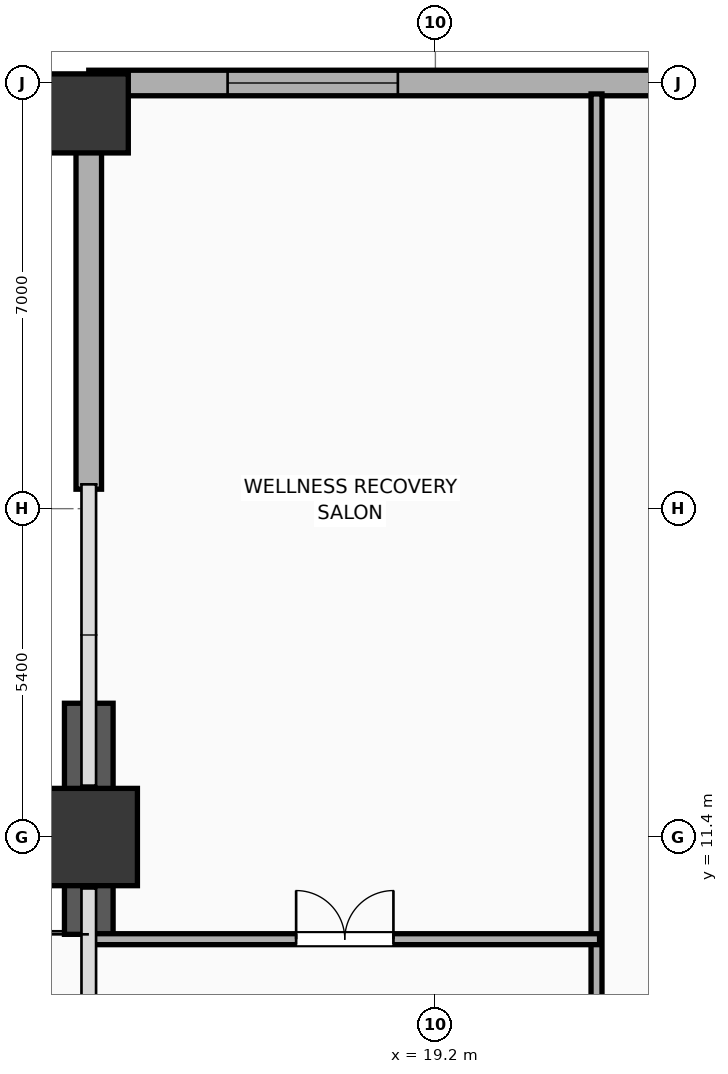
"""IFC4 building model, lengths in metres.
Left out: names, types, materials, properties, quantities, classifications, styles, units other than length and angle.
Written with IfcOpenShell. Run it as: python <this file> out.ifc"""

import sys

from ifc_helpers import new_model, si_unit, direction, frame, frame_2d, origin, origin_2d, place, context, subcontext, project, spatial, rectangle, extrude, element, fill, save


model = new_model("IFC4")
c1 = context("Model", 3, precision=1e-05, world=origin(), true_north=direction((0.0, 1.0)))
c2 = subcontext(c1, "Body", "Model", "MODEL_VIEW")
j1 = project(units=[si_unit("LENGTHUNIT", "METRE"), si_unit("PLANEANGLEUNIT", "RADIAN")], contexts=[c1])
p1 = place(None, origin())
s1 = spatial("IfcSite", under=j1, at=p1, CompositionType="ELEMENT")
p2 = place(p1, origin())
s2 = spatial("IfcBuilding", under=s1, at=p2, CompositionType="ELEMENT")
p3 = place(p2, frame((0.0, 0.0, 10.4)))
s3 = spatial("IfcBuildingStorey", under=s2, at=p3, CompositionType="ELEMENT", Elevation=10.4)
p4 = place(p3, frame((13.5, 11.4, 0.0), z_axis=(0.0, 0.0, 1.0), x_axis=(1.0, 0.0, 0.0)))
e1 = element("IfcColumn", 1, at=p4, inside=s3, PredefinedType="COLUMN", context=c2, shape_type="SweptSolid", body=[
    extrude(rectangle(XDim=1.6, YDim=1.6, at=origin_2d()), origin(), (0.0, 0.0, 1.0), 5.2),
])
p5 = place(p3, frame((13.5, 23.3, 0.0), z_axis=(0.0, 0.0, 1.0), x_axis=(1.0, 0.0, 0.0)))
e2 = element("IfcColumn", 2, at=p5, inside=s3, PredefinedType="COLUMN", context=c2, shape_type="SweptSolid", body=[
    extrude(rectangle(XDim=1.3, YDim=1.3, at=origin_2d()), origin(), (0.0, 0.0, 1.0), 5.2),
])
p6 = place(p3, frame((13.5, 9.8, 0.0), z_axis=(0.0, 0.0, 1.0), x_axis=(0.0, 1.0, 0.0)))
e3 = element("IfcWall", 3, at=p6, inside=s3, PredefinedType="SOLIDWALL", context=c2, shape_type="SweptSolid", body=[
    extrude(rectangle(XDim=3.8, YDim=0.8, at=frame_2d((1.9, 0.0))), origin(), (0.0, 0.0, 1.0), 4.92),
])
p7 = place(p3, frame((35.6, 23.8, 0.0), z_axis=(0.0, 0.0, 1.0), x_axis=(-1.0, 0.0, 0.0)))
e4 = element("IfcWall", 4, at=p7, inside=s3, PredefinedType="ELEMENTEDWALL", context=c2, shape_type="SweptSolid", body=[
    extrude(rectangle(XDim=22.1, YDim=0.42, at=frame_2d((11.05, 0.0))), origin(), (0.0, 0.0, 1.0), 4.92),
])
p8 = place(p7, frame((2.283, 0.0, 0.65)))
e5 = element("IfcOpeningElement", 5, at=p8, cuts=e4, PredefinedType="OPENING", context=c2, shape_type="SweptSolid", body=[
    extrude(rectangle(XDim=2.8, YDim=2.6, at=frame_2d((1.4, 1.3))), frame((0.0, 0.22, 0.0), z_axis=(0.0, -1.0, 0.0), x_axis=(1.0, 0.0, 0.0)), (0.0, 0.0, 1.0), 0.44),
])
p9 = place(p7, frame((17.017, 0.0, 0.65)))
e6 = element("IfcOpeningElement", 6, at=p9, cuts=e4, PredefinedType="OPENING", context=c2, shape_type="SweptSolid", body=[
    extrude(rectangle(XDim=2.8, YDim=2.6, at=frame_2d((1.4, 1.3))), frame((0.0, 0.22, 0.0), z_axis=(0.0, -1.0, 0.0), x_axis=(1.0, 0.0, 0.0)), (0.0, 0.0, 1.0), 0.44),
])
p10 = place(p3, frame((13.5, 17.12, 0.0), z_axis=(0.0, 0.0, 1.0), x_axis=(0.0, 1.0, 0.0)))
e7 = element("IfcWall", 7, at=p10, inside=s3, PredefinedType="ELEMENTEDWALL", context=c2, shape_type="SweptSolid", body=[
    extrude(rectangle(XDim=6.68, YDim=0.42, at=frame_2d((3.34, 0.0))), origin(), (0.0, 0.0, 1.0), 4.21),
])
p11 = place(p3, frame((21.85, -10.5, 0.0), z_axis=(0.0, 0.0, 1.0), x_axis=(0.0, 1.0, 0.0)))
e8 = element("IfcWall", 8, at=p11, inside=s3, PredefinedType="PARTITIONING", context=c2, shape_type="SweptSolid", body=[
    extrude(rectangle(XDim=34.12, YDim=0.18, at=frame_2d((17.06, 0.0))), origin(), (0.0, 0.0, 1.0), 4.92),
])
p12 = place(p11, frame((13.531, 0.0, 0.0)))
e9 = element("IfcOpeningElement", 9, at=p12, cuts=e8, PredefinedType="OPENING", context=c2, shape_type="SweptSolid", body=[
    extrude(rectangle(XDim=1.6, YDim=2.05, at=frame_2d((0.8, 1.025))), frame((0.0, 0.1, 0.0), z_axis=(0.0, -1.0, 0.0), x_axis=(1.0, 0.0, 0.0)), (0.0, 0.0, 1.0), 0.2),
])
p13 = place(p3, frame((13.52, 9.72, 0.0), z_axis=(0.0, 0.0, 1.0), x_axis=(1.0, 0.0, 0.0)))
e10 = element("IfcWall", 10, at=p13, inside=s3, PredefinedType="PARTITIONING", context=c2, shape_type="SweptSolid", body=[
    extrude(rectangle(XDim=8.38, YDim=0.18, at=frame_2d((4.19, 0.0))), origin(), (0.0, 0.0, 1.0), 4.92),
])
p14 = place(p13, frame((3.39, 0.0, 0.0)))
e11 = element("IfcOpeningElement", 11, at=p14, cuts=e10, PredefinedType="OPENING", context=c2, shape_type="SweptSolid", body=[
    extrude(rectangle(XDim=1.6, YDim=2.05, at=frame_2d((0.8, 1.025))), frame((0.0, 0.1, 0.0), z_axis=(0.0, -1.0, 0.0), x_axis=(1.0, 0.0, 0.0)), (0.0, 0.0, 1.0), 0.2),
])
p15 = place(p9, origin())
e12 = element("IfcWindow", 12, at=p15, inside=s3, PartitioningType="SINGLE_PANEL", PredefinedType="WINDOW", context=c2, shape_type="SweptSolid", body=[
    extrude(rectangle(XDim=2.8, YDim=2.6, at=frame_2d((1.4, 1.3))), frame((0.0, 0.03, 0.0), z_axis=(0.0, -1.0, 0.0), x_axis=(1.0, 0.0, 0.0)), (0.0, 0.0, 1.0), 0.06),
])
fill(e6, e12)
p16 = place(p14, origin())
e13 = element("IfcDoor", 13, at=p16, inside=s3, OperationType="DOUBLE_DOOR_SINGLE_SWING", PredefinedType="DOOR", context=c2, shape_type="SweptSolid", body=[
    extrude(rectangle(XDim=1.6, YDim=2.05, at=frame_2d((0.8, 1.025))), frame((0.0, 0.025, 0.0), z_axis=(0.0, -1.0, 0.0), x_axis=(1.0, 0.0, 0.0)), (0.0, 0.0, 1.0), 0.05),
])
fill(e11, e13)
save(model, sys.argv[1])
